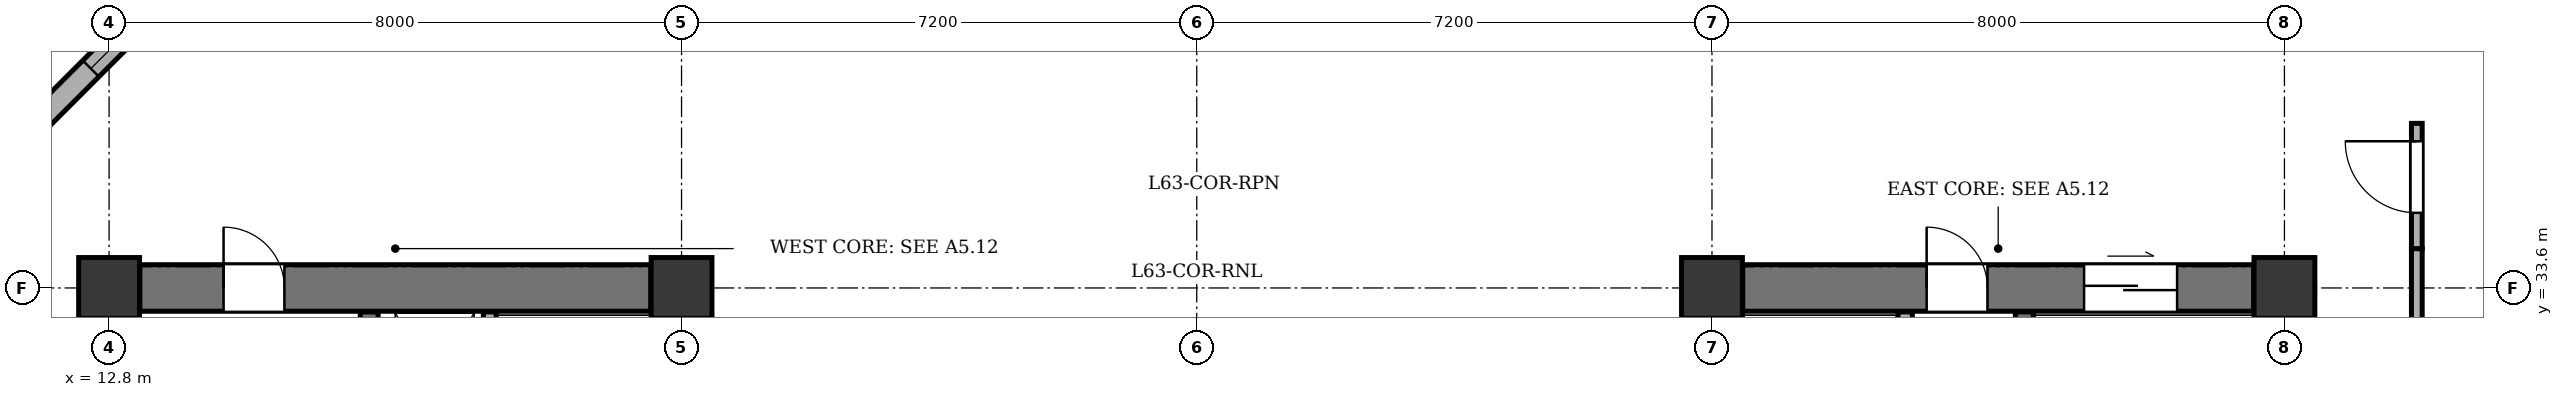
"""IFC4 building model, lengths in metres.
Left out: names, types, materials, properties, quantities, classifications, styles, units other than length and angle.
Written with IfcOpenShell. Run it as: python <this file> out.ifc"""

import sys

from ifc_helpers import new_model, si_unit, direction, frame, frame_2d, origin, origin_2d, place, context, subcontext, project, spatial, rectangle, extrude, element, fill, save


model = new_model("IFC4")
c1 = context("Model", 3, precision=1e-05, world=origin(), true_north=direction((0.0, 1.0)))
c2 = subcontext(c1, "Body", "Model", "MODEL_VIEW")
j1 = project(units=[si_unit("LENGTHUNIT", "METRE"), si_unit("PLANEANGLEUNIT", "RADIAN")], contexts=[c1])
p1 = place(None, origin())
s1 = spatial("IfcSite", under=j1, at=p1, CompositionType="ELEMENT")
p2 = place(p1, origin())
s2 = spatial("IfcBuilding", under=s1, at=p2, CompositionType="ELEMENT")
p3 = place(p2, frame((0.0, 0.0, 241.5)))
s3 = spatial("IfcBuildingStorey", under=s2, at=p3, CompositionType="ELEMENT", Elevation=241.5)
for number, where, z_axis, x_axis in (
    (1, (12.8, 33.6, 0.0), (0.0, 0.0, 1.0), (1.0, 0.0, 0.0)),
    (2, (20.8, 33.6, 0.0), (0.0, 0.0, 1.0), (1.0, 0.0, 0.0)),
    (3, (35.2, 33.6, 0.0), (0.0, 0.0, 1.0), (1.0, 0.0, 0.0)),
    (4, (43.2, 33.6, 0.0), (0.0, 0.0, 1.0), (1.0, 0.0, 0.0)),
):
    element("IfcColumn", number, at=place(p3, frame(where, z_axis=z_axis, x_axis=x_axis)), inside=s3, PredefinedType="COLUMN", context=c2, shape_type="SweptSolid", body=[
        extrude(rectangle(XDim=0.85, YDim=0.85, at=origin_2d()), origin(), (0.0, 0.0, 1.0), 3.4),
    ])
p4 = place(p3, frame((10.88, 35.0, 0.0), z_axis=(0.0, 0.0, 1.0), x_axis=(0.707106781187, 0.707106781187, 0.0)))
e5 = element("IfcWall", 5, at=p4, inside=s3, PredefinedType="STANDARD", context=c2, shape_type="SweptSolid", body=[
    extrude(rectangle(XDim=6.11, YDim=0.32, at=frame_2d((3.055, 0.0))), origin(), (0.0, 0.0, 1.0), 2.725),
])
p5 = place(p4, frame((2.355, 0.0, 0.75)))
e6 = element("IfcOpeningElement", 6, at=p5, cuts=e5, PredefinedType="OPENING", context=c2, shape_type="SweptSolid", body=[
    extrude(rectangle(XDim=1.4, YDim=1.65, at=frame_2d((0.7, 0.825))), frame((0.0, 0.17, 0.0), z_axis=(0.0, -1.0, 0.0), x_axis=(1.0, 0.0, 0.0)), (0.0, 0.0, 1.0), 0.34),
])
p6 = place(p3, frame((13.23, 33.6, 0.0), z_axis=(0.0, 0.0, 1.0), x_axis=(1.0, 0.0, 0.0)))
e7 = element("IfcWall", 7, at=p6, inside=s3, PredefinedType="SHEAR", context=c2, shape_type="SweptSolid", body=[
    extrude(rectangle(XDim=7.14, YDim=0.65, at=frame_2d((3.57, 0.0))), origin(), (0.0, 0.0, 1.0), 3.1),
])
p7 = place(p6, frame((1.17, 0.0, 0.0)))
e8 = element("IfcOpeningElement", 8, at=p7, cuts=e7, PredefinedType="OPENING", context=c2, shape_type="SweptSolid", body=[
    extrude(rectangle(XDim=0.85, YDim=2.02, at=frame_2d((0.425, 1.01))), frame((0.0, 0.335, 0.0), z_axis=(0.0, -1.0, 0.0), x_axis=(1.0, 0.0, 0.0)), (0.0, 0.0, 1.0), 0.67),
])
p8 = place(p3, frame((16.435, 21.135, 0.0), z_axis=(0.0, 0.0, 1.0), x_axis=(0.0, 1.0, 0.0)))
e9 = element("IfcWall", 9, at=p8, inside=s3, PredefinedType="SHEAR", context=c2, shape_type="SweptSolid", body=[
    extrude(rectangle(XDim=12.13, YDim=0.25, at=frame_2d((6.065, 0.0))), origin(), (0.0, 0.0, 1.0), 3.1),
])
p9 = place(p8, frame((0.515, 0.0, 0.0)))
e10 = element("IfcOpeningElement", 10, at=p9, cuts=e9, PredefinedType="OPENING", context=c2, shape_type="SweptSolid", body=[
    extrude(rectangle(XDim=1.2, YDim=2.15, at=frame_2d((0.6, 1.075))), frame((0.0, 0.135, 0.0), z_axis=(0.0, -1.0, 0.0), x_axis=(1.0, 0.0, 0.0)), (0.0, 0.0, 1.0), 0.27),
])
p10 = place(p8, frame((2.665, 0.0, 0.0)))
e11 = element("IfcOpeningElement", 11, at=p10, cuts=e9, PredefinedType="OPENING", context=c2, shape_type="SweptSolid", body=[
    extrude(rectangle(XDim=1.15, YDim=2.15, at=frame_2d((0.575, 1.075))), frame((0.0, 0.135, 0.0), z_axis=(0.0, -1.0, 0.0), x_axis=(1.0, 0.0, 0.0)), (0.0, 0.0, 1.0), 0.27),
])
p11 = place(p3, frame((18.12, 31.17, 0.0), z_axis=(0.0, 0.0, 1.0), x_axis=(0.0, 1.0, 0.0)))
e12 = element("IfcWall", 12, at=p11, inside=s3, PredefinedType="PARTITIONING", context=c2, shape_type="SweptSolid", body=[
    extrude(rectangle(XDim=2.095, YDim=0.18, at=frame_2d((1.047, 0.0))), origin(), (0.0, 0.0, 1.0), 3.1),
])
p12 = place(p3, frame((35.63, 33.6, 0.0), z_axis=(0.0, 0.0, 1.0), x_axis=(1.0, 0.0, 0.0)))
e13 = element("IfcWall", 13, at=p12, inside=s3, PredefinedType="SHEAR", context=c2, shape_type="SweptSolid", body=[
    extrude(rectangle(XDim=7.14, YDim=0.65, at=frame_2d((3.57, 0.0))), origin(), (0.0, 0.0, 1.0), 3.1),
])
p13 = place(p12, frame((4.77, 0.0, 0.0)))
e14 = element("IfcOpeningElement", 14, at=p13, cuts=e13, PredefinedType="OPENING", context=c2, shape_type="SweptSolid", body=[
    extrude(rectangle(XDim=1.3, YDim=2.15, at=frame_2d((0.65, 1.075))), frame((0.0, 0.335, 0.0), z_axis=(0.0, -1.0, 0.0), x_axis=(1.0, 0.0, 0.0)), (0.0, 0.0, 1.0), 0.67),
])
p14 = place(p12, frame((2.57, 0.0, 0.0)))
e15 = element("IfcOpeningElement", 15, at=p14, cuts=e13, PredefinedType="OPENING", context=c2, shape_type="SweptSolid", body=[
    extrude(rectangle(XDim=0.85, YDim=2.02, at=frame_2d((0.425, 1.01))), frame((0.0, 0.335, 0.0), z_axis=(0.0, -1.0, 0.0), x_axis=(1.0, 0.0, 0.0)), (0.0, 0.0, 1.0), 0.67),
])
p15 = place(p3, frame((39.565, 21.135, 0.0), z_axis=(0.0, 0.0, 1.0), x_axis=(0.0, 1.0, 0.0)))
e16 = element("IfcWall", 16, at=p15, inside=s3, PredefinedType="SHEAR", context=c2, shape_type="SweptSolid", body=[
    extrude(rectangle(XDim=12.13, YDim=0.25, at=frame_2d((6.065, 0.0))), origin(), (0.0, 0.0, 1.0), 3.1),
])
p16 = place(p15, frame((0.515, 0.0, 0.0)))
e17 = element("IfcOpeningElement", 17, at=p16, cuts=e16, PredefinedType="OPENING", context=c2, shape_type="SweptSolid", body=[
    extrude(rectangle(XDim=1.2, YDim=2.15, at=frame_2d((0.6, 1.075))), frame((0.0, 0.135, 0.0), z_axis=(0.0, -1.0, 0.0), x_axis=(1.0, 0.0, 0.0)), (0.0, 0.0, 1.0), 0.27),
])
p17 = place(p15, frame((2.665, 0.0, 0.0)))
e18 = element("IfcOpeningElement", 18, at=p17, cuts=e16, PredefinedType="OPENING", context=c2, shape_type="SweptSolid", body=[
    extrude(rectangle(XDim=1.15, YDim=2.15, at=frame_2d((0.575, 1.075))), frame((0.0, 0.135, 0.0), z_axis=(0.0, -1.0, 0.0), x_axis=(1.0, 0.0, 0.0)), (0.0, 0.0, 1.0), 0.27),
])
p18 = place(p3, frame((37.9, 25.27, 0.0), z_axis=(0.0, 0.0, 1.0), x_axis=(0.0, 1.0, 0.0)))
e19 = element("IfcWall", 19, at=p18, inside=s3, PredefinedType="SOLIDWALL", context=c2, shape_type="SweptSolid", body=[
    extrude(rectangle(XDim=7.995, YDim=0.2, at=frame_2d((3.998, 0.0))), origin(), (0.0, 0.0, 1.0), 3.1),
])
p19 = place(p3, frame((45.05, 20.25, 0.0), z_axis=(0.0, 0.0, 1.0), x_axis=(0.0, 1.0, 0.0)))
e20 = element("IfcWall", 20, at=p19, inside=s3, PredefinedType="PARTITIONING", context=c2, shape_type="SweptSolid", body=[
    extrude(rectangle(XDim=13.9, YDim=0.15, at=frame_2d((6.95, 0.0))), origin(), (0.0, 0.0, 1.0), 2.725),
])
p20 = place(p3, frame((45.05, 34.15, 0.0), z_axis=(0.0, 0.0, 1.0), x_axis=(0.0, 1.0, 0.0)))
e21 = element("IfcWall", 21, at=p20, inside=s3, PredefinedType="PARTITIONING", context=c2, shape_type="SweptSolid", body=[
    extrude(rectangle(XDim=1.75, YDim=0.15, at=frame_2d((0.875, 0.0))), origin(), (0.0, 0.0, 1.0), 2.725),
])
p21 = place(p20, frame((0.5, 0.0, 0.0)))
e22 = element("IfcOpeningElement", 22, at=p21, cuts=e21, PredefinedType="OPENING", context=c2, shape_type="SweptSolid", body=[
    extrude(rectangle(XDim=1.0, YDim=2.1, at=frame_2d((0.5, 1.05))), frame((0.0, 0.085, 0.0), z_axis=(0.0, -1.0, 0.0), x_axis=(1.0, 0.0, 0.0)), (0.0, 0.0, 1.0), 0.17),
])
p22 = place(p5, origin())
e23 = element("IfcWindow", 23, at=p22, inside=s3, PartitioningType="SINGLE_PANEL", PredefinedType="WINDOW", context=c2, shape_type="SweptSolid", body=[
    extrude(rectangle(XDim=1.4, YDim=1.65, at=frame_2d((0.7, 0.825))), frame((0.0, -0.01, 0.0), z_axis=(0.0, -1.0, 0.0), x_axis=(1.0, 0.0, 0.0)), (0.0, 0.0, 1.0), 0.06),
])
fill(e6, e23)
p23 = place(p7, origin())
e24 = element("IfcDoor", 24, at=p23, inside=s3, OperationType="SINGLE_SWING_LEFT", PredefinedType="DOOR", context=c2, shape_type="SweptSolid", body=[
    extrude(rectangle(XDim=0.85, YDim=2.02, at=frame_2d((0.425, 1.01))), frame((0.0, 0.025, 0.0), z_axis=(0.0, -1.0, 0.0), x_axis=(1.0, 0.0, 0.0)), (0.0, 0.0, 1.0), 0.05),
])
fill(e8, e24)
p24 = place(p13, origin())
e25 = element("IfcDoor", 25, at=p24, inside=s3, OperationType="DOUBLE_DOOR_SLIDING", PredefinedType="DOOR", context=c2, shape_type="SweptSolid", body=[
    extrude(rectangle(XDim=1.3, YDim=2.15, at=frame_2d((0.65, 1.075))), frame((0.0, 0.025, 0.0), z_axis=(0.0, -1.0, 0.0), x_axis=(1.0, 0.0, 0.0)), (0.0, 0.0, 1.0), 0.05),
])
fill(e14, e25)
p25 = place(p14, origin())
e26 = element("IfcDoor", 26, at=p25, inside=s3, OperationType="SINGLE_SWING_LEFT", PredefinedType="DOOR", context=c2, shape_type="SweptSolid", body=[
    extrude(rectangle(XDim=0.85, YDim=2.02, at=frame_2d((0.425, 1.01))), frame((0.0, 0.025, 0.0), z_axis=(0.0, -1.0, 0.0), x_axis=(1.0, 0.0, 0.0)), (0.0, 0.0, 1.0), 0.05),
])
fill(e15, e26)
p26 = place(p21, origin())
e27 = element("IfcDoor", 27, at=p26, inside=s3, OperationType="SINGLE_SWING_RIGHT", PredefinedType="DOOR", context=c2, shape_type="SweptSolid", body=[
    extrude(rectangle(XDim=1.0, YDim=2.1, at=frame_2d((0.5, 1.05))), frame((0.0, 0.025, 0.0), z_axis=(0.0, -1.0, 0.0), x_axis=(1.0, 0.0, 0.0)), (0.0, 0.0, 1.0), 0.05),
])
fill(e22, e27)
save(model, sys.argv[1])
